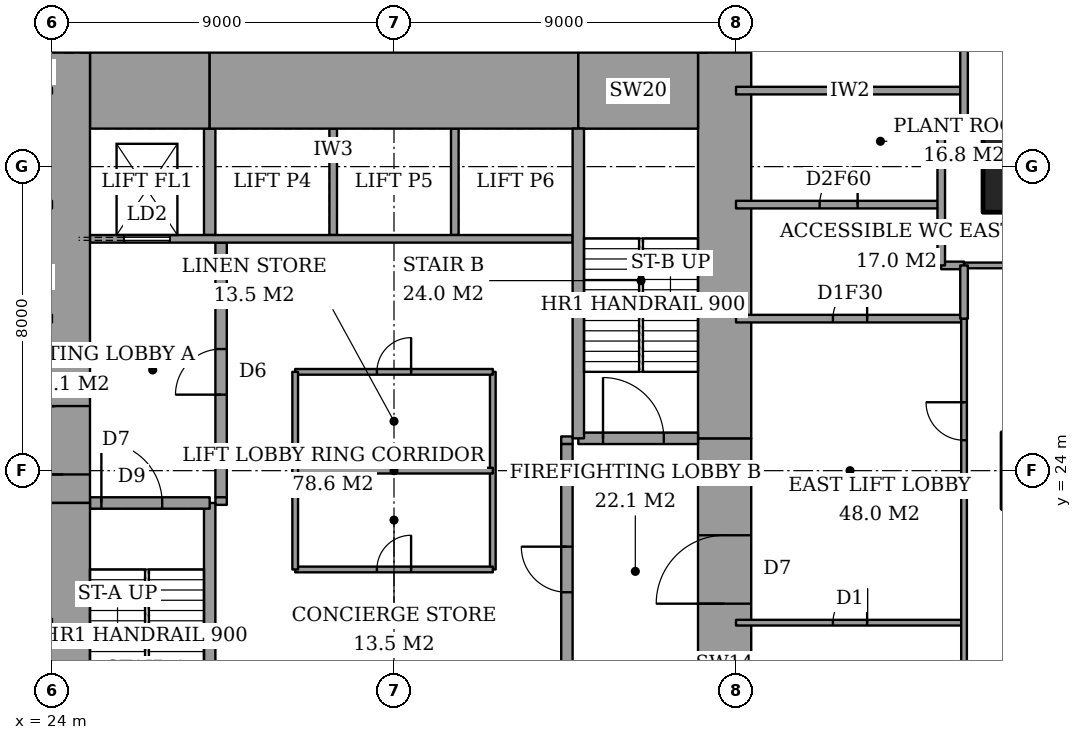
"""IFC4 building model, lengths in metres.
Left out: names, types, materials, properties, quantities, classifications, styles, units other than length and angle.
Written with IfcOpenShell. Run it as: python <this file> out.ifc"""

import sys

from ifc_helpers import new_model, si_unit, direction, frame, frame_2d, origin, origin_2d, place, context, subcontext, project, spatial, rectangle, extrude, element, fill, save


model = new_model("IFC4")
c1 = context("Model", 3, precision=1e-05, world=origin(), true_north=direction((0.0, 1.0)))
c2 = subcontext(c1, "Body", "Model", "MODEL_VIEW")
j1 = project(units=[si_unit("LENGTHUNIT", "METRE"), si_unit("PLANEANGLEUNIT", "RADIAN")], contexts=[c1])
p1 = place(None, origin())
s1 = spatial("IfcSite", under=j1, at=p1, CompositionType="ELEMENT")
p2 = place(p1, origin())
s2 = spatial("IfcBuilding", under=s1, at=p2, CompositionType="ELEMENT")
p3 = place(p2, frame((0.0, 0.0, 6.0)))
s3 = spatial("IfcBuildingStorey", under=s2, at=p3, CompositionType="ELEMENT", Elevation=6.0)
p4 = place(p3, frame((50.0, 32.0, 0.0), z_axis=(0.0, 0.0, 1.0), x_axis=(1.0, 0.0, 0.0)))
e1 = element("IfcColumn", 1, at=p4, inside=s3, PredefinedType="COLUMN", context=c2, shape_type="SweptSolid", body=[
    extrude(rectangle(XDim=3.0, YDim=2.4, at=origin_2d()), origin(), (0.0, 0.0, 1.0), 5.0),
])
p5 = place(p3, frame((25.0, 34.0, 0.0), z_axis=(0.0, 0.0, 1.0), x_axis=(1.0, 0.0, 0.0)))
e2 = element("IfcWall", 2, at=p5, inside=s3, PredefinedType="SHEAR", context=c2, shape_type="SweptSolid", body=[
    extrude(rectangle(XDim=3.15, YDim=2.0, at=frame_2d((1.575, 0.0))), origin(), (0.0, 0.0, 1.0), 5.0),
])
p6 = place(p3, frame((28.15, 34.0, 0.0), z_axis=(0.0, 0.0, 1.0), x_axis=(1.0, 0.0, 0.0)))
e3 = element("IfcWall", 3, at=p6, inside=s3, PredefinedType="SHEAR", context=c2, shape_type="SweptSolid", body=[
    extrude(rectangle(XDim=9.7, YDim=2.0, at=frame_2d((4.85, 0.0))), origin(), (0.0, 0.0, 1.0), 5.0),
])
p7 = place(p3, frame((37.85, 34.0, 0.0), z_axis=(0.0, 0.0, 1.0), x_axis=(1.0, 0.0, 0.0)))
e4 = element("IfcWall", 4, at=p7, inside=s3, PredefinedType="SHEAR", context=c2, shape_type="SweptSolid", body=[
    extrude(rectangle(XDim=3.15, YDim=2.0, at=frame_2d((1.575, 0.0))), origin(), (0.0, 0.0, 1.0), 5.0),
])
p8 = place(p3, frame((24.3, 13.0, 0.0), z_axis=(0.0, 0.0, 1.0), x_axis=(0.0, 1.0, 0.0)))
e5 = element("IfcWall", 5, at=p8, inside=s3, PredefinedType="SHEAR", context=c2, shape_type="SweptSolid", body=[
    extrude(rectangle(XDim=10.15, YDim=1.4, at=frame_2d((5.075, 0.0))), origin(), (0.0, 0.0, 1.0), 5.0),
])
p9 = place(p3, frame((24.3, 23.15, 0.0), z_axis=(0.0, 0.0, 1.0), x_axis=(0.0, 1.0, 0.0)))
e6 = element("IfcWall", 6, at=p9, inside=s3, PredefinedType="SHEAR", context=c2, shape_type="SweptSolid", body=[
    extrude(rectangle(XDim=11.85, YDim=1.4, at=frame_2d((5.925, 0.0))), origin(), (0.0, 0.0, 1.0), 5.0),
])
p10 = place(p9, frame((0.75, 0.0, 0.0)))
e7 = element("IfcOpeningElement", 7, at=p10, cuts=e6, PredefinedType="OPENING", context=c2, shape_type="SweptSolid", body=[
    extrude(rectangle(XDim=1.8, YDim=2.4, at=frame_2d((0.9, 1.2))), frame((0.0, 0.71, 0.0), z_axis=(0.0, -1.0, 0.0), x_axis=(1.0, 0.0, 0.0)), (0.0, 0.0, 1.0), 1.42),
])
p11 = place(p3, frame((41.7, 13.0, 0.0), z_axis=(0.0, 0.0, 1.0), x_axis=(0.0, 1.0, 0.0)))
e8 = element("IfcWall", 8, at=p11, inside=s3, PredefinedType="SHEAR", context=c2, shape_type="SweptSolid", body=[
    extrude(rectangle(XDim=11.85, YDim=1.4, at=frame_2d((5.925, 0.0))), origin(), (0.0, 0.0, 1.0), 5.0),
])
p12 = place(p11, frame((7.5, 0.0, 0.0)))
e9 = element("IfcOpeningElement", 9, at=p12, cuts=e8, PredefinedType="OPENING", context=c2, shape_type="SweptSolid", body=[
    extrude(rectangle(XDim=1.8, YDim=2.4, at=frame_2d((0.9, 1.2))), frame((0.0, 0.71, 0.0), z_axis=(0.0, -1.0, 0.0), x_axis=(1.0, 0.0, 0.0)), (0.0, 0.0, 1.0), 1.42),
])
p13 = place(p3, frame((41.7, 24.85, 0.0), z_axis=(0.0, 0.0, 1.0), x_axis=(0.0, 1.0, 0.0)))
e10 = element("IfcWall", 10, at=p13, inside=s3, PredefinedType="SHEAR", context=c2, shape_type="SweptSolid", body=[
    extrude(rectangle(XDim=10.15, YDim=1.4, at=frame_2d((5.075, 0.0))), origin(), (0.0, 0.0, 1.0), 5.0),
])
p14 = place(p3, frame((28.15, 15.0, 0.0), z_axis=(0.0, 0.0, 1.0), x_axis=(0.0, 1.0, 0.0)))
e11 = element("IfcWall", 11, at=p14, inside=s3, PredefinedType="SHEAR", context=c2, shape_type="SweptSolid", body=[
    extrude(rectangle(XDim=8.15, YDim=0.3, at=frame_2d((4.075, 0.0))), origin(), (0.0, 0.0, 1.0), 5.0),
])
p15 = place(p3, frame((25.0, 23.15, 0.0), z_axis=(0.0, 0.0, 1.0), x_axis=(1.0, 0.0, 0.0)))
e12 = element("IfcWall", 12, at=p15, inside=s3, PredefinedType="SHEAR", context=c2, shape_type="SweptSolid", body=[
    extrude(rectangle(XDim=3.15, YDim=0.3, at=frame_2d((1.575, 0.0))), origin(), (0.0, 0.0, 1.0), 5.0),
])
p16 = place(p15, frame((0.3, 0.0, 0.0)))
e13 = element("IfcOpeningElement", 13, at=p16, cuts=e12, PredefinedType="OPENING", context=c2, shape_type="SweptSolid", body=[
    extrude(rectangle(XDim=1.6, YDim=2.1, at=frame_2d((0.8, 1.05))), frame((0.0, 0.16, 0.0), z_axis=(0.0, -1.0, 0.0), x_axis=(1.0, 0.0, 0.0)), (0.0, 0.0, 1.0), 0.32),
])
p17 = place(p3, frame((37.85, 24.85, 0.0), z_axis=(0.0, 0.0, 1.0), x_axis=(0.0, 1.0, 0.0)))
e14 = element("IfcWall", 14, at=p17, inside=s3, PredefinedType="SHEAR", context=c2, shape_type="SweptSolid", body=[
    extrude(rectangle(XDim=8.15, YDim=0.3, at=frame_2d((4.075, 0.0))), origin(), (0.0, 0.0, 1.0), 5.0),
])
p18 = place(p3, frame((37.85, 24.85, 0.0), z_axis=(0.0, 0.0, 1.0), x_axis=(1.0, 0.0, 0.0)))
e15 = element("IfcWall", 15, at=p18, inside=s3, PredefinedType="SHEAR", context=c2, shape_type="SweptSolid", body=[
    extrude(rectangle(XDim=3.15, YDim=0.3, at=frame_2d((1.575, 0.0))), origin(), (0.0, 0.0, 1.0), 5.0),
])
p19 = place(p18, frame((0.65, 0.0, 0.0)))
e16 = element("IfcOpeningElement", 16, at=p19, cuts=e15, PredefinedType="OPENING", context=c2, shape_type="SweptSolid", body=[
    extrude(rectangle(XDim=1.6, YDim=2.1, at=frame_2d((0.8, 1.05))), frame((0.0, 0.16, 0.0), z_axis=(0.0, -1.0, 0.0), x_axis=(1.0, 0.0, 0.0)), (0.0, 0.0, 1.0), 0.32),
])
p20 = place(p3, frame((28.45, 23.3, 0.0), z_axis=(0.0, 0.0, 1.0), x_axis=(0.0, 1.0, 0.0)))
e17 = element("IfcWall", 17, at=p20, inside=s3, PredefinedType="PARTITIONING", context=c2, shape_type="SweptSolid", body=[
    extrude(rectangle(XDim=6.7, YDim=0.3, at=frame_2d((3.35, 0.0))), origin(), (0.0, 0.0, 1.0), 5.0),
])
p21 = place(p20, frame((2.7, 0.0, 0.0)))
e18 = element("IfcOpeningElement", 18, at=p21, cuts=e17, PredefinedType="OPENING", context=c2, shape_type="SweptSolid", body=[
    extrude(rectangle(XDim=1.2, YDim=2.1, at=frame_2d((0.6, 1.05))), frame((0.0, 0.16, 0.0), z_axis=(0.0, -1.0, 0.0), x_axis=(1.0, 0.0, 0.0)), (0.0, 0.0, 1.0), 0.32),
])
p22 = place(p3, frame((37.55, 18.0, 0.0), z_axis=(0.0, 0.0, 1.0), x_axis=(0.0, 1.0, 0.0)))
e19 = element("IfcWall", 19, at=p22, inside=s3, PredefinedType="PARTITIONING", context=c2, shape_type="SweptSolid", body=[
    extrude(rectangle(XDim=6.7, YDim=0.3, at=frame_2d((3.35, 0.0))), origin(), (0.0, 0.0, 1.0), 5.0),
])
p23 = place(p22, frame((2.8, 0.0, 0.0)))
e20 = element("IfcOpeningElement", 20, at=p23, cuts=e19, PredefinedType="OPENING", context=c2, shape_type="SweptSolid", body=[
    extrude(rectangle(XDim=1.2, YDim=2.1, at=frame_2d((0.6, 1.05))), frame((0.0, 0.16, 0.0), z_axis=(0.0, -1.0, 0.0), x_axis=(1.0, 0.0, 0.0)), (0.0, 0.0, 1.0), 0.32),
])
p24 = place(p3, frame((42.0, 20.0, 0.0), z_axis=(0.0, 0.0, 1.0), x_axis=(1.0, 0.0, 0.0)))
e21 = element("IfcWall", 21, at=p24, inside=s3, PredefinedType="PARTITIONING", context=c2, shape_type="SweptSolid", body=[
    extrude(rectangle(XDim=6.0, YDim=0.15, at=frame_2d((3.0, 0.0))), origin(), (0.0, 0.0, 1.0), 4.7),
])
p25 = place(p24, frame((2.55, 0.0, 0.0)))
e22 = element("IfcOpeningElement", 22, at=p25, cuts=e21, PredefinedType="OPENING", context=c2, shape_type="SweptSolid", body=[
    extrude(rectangle(XDim=0.9, YDim=2.1, at=frame_2d((0.45, 1.05))), frame((0.0, 0.085, 0.0), z_axis=(0.0, -1.0, 0.0), x_axis=(1.0, 0.0, 0.0)), (0.0, 0.0, 1.0), 0.17),
])
p26 = place(p3, frame((42.0, 28.0, 0.0), z_axis=(0.0, 0.0, 1.0), x_axis=(1.0, 0.0, 0.0)))
e23 = element("IfcWall", 23, at=p26, inside=s3, PredefinedType="PARTITIONING", context=c2, shape_type="SweptSolid", body=[
    extrude(rectangle(XDim=6.0, YDim=0.2, at=frame_2d((3.0, 0.0))), origin(), (0.0, 0.0, 1.0), 4.7),
])
p27 = place(p26, frame((2.55, 0.0, 0.0)))
e24 = element("IfcOpeningElement", 24, at=p27, cuts=e23, PredefinedType="OPENING", context=c2, shape_type="SweptSolid", body=[
    extrude(rectangle(XDim=0.9, YDim=2.1, at=frame_2d((0.45, 1.05))), frame((0.0, 0.11, 0.0), z_axis=(0.0, -1.0, 0.0), x_axis=(1.0, 0.0, 0.0)), (0.0, 0.0, 1.0), 0.22),
])
p28 = place(p3, frame((47.4, 29.4, 0.0), z_axis=(0.0, 0.0, 1.0), x_axis=(1.0, 0.0, 0.0)))
e25 = element("IfcWall", 25, at=p28, inside=s3, PredefinedType="PARTITIONING", context=c2, shape_type="SweptSolid", body=[
    extrude(rectangle(XDim=0.6, YDim=0.2, at=frame_2d((0.3, 0.0))), origin(), (0.0, 0.0, 1.0), 4.7),
])
p29 = place(p3, frame((48.0, 29.4, 0.0), z_axis=(0.0, 0.0, 1.0), x_axis=(1.0, 0.0, 0.0)))
e26 = element("IfcWall", 26, at=p29, inside=s3, PredefinedType="PARTITIONING", context=c2, shape_type="SweptSolid", body=[
    extrude(rectangle(XDim=26.6, YDim=0.15, at=frame_2d((13.3, 0.0))), origin(), (0.0, 0.0, 1.0), 4.7),
])
p30 = place(p29, frame((3.5, 0.0, 0.0)))
e27 = element("IfcOpeningElement", 27, at=p30, cuts=e26, PredefinedType="OPENING", context=c2, shape_type="SweptSolid", body=[
    extrude(rectangle(XDim=1.0, YDim=2.1, at=frame_2d((0.5, 1.05))), frame((0.0, 0.085, 0.0), z_axis=(0.0, -1.0, 0.0), x_axis=(1.0, 0.0, 0.0)), (0.0, 0.0, 1.0), 0.17),
])
p31 = place(p3, frame((42.0, 31.0, 0.0), z_axis=(0.0, 0.0, 1.0), x_axis=(1.0, 0.0, 0.0)))
e28 = element("IfcWall", 28, at=p31, inside=s3, PredefinedType="PARTITIONING", context=c2, shape_type="SweptSolid", body=[
    extrude(rectangle(XDim=5.4, YDim=0.2, at=frame_2d((2.7, 0.0))), origin(), (0.0, 0.0, 1.0), 4.7),
])
p32 = place(p31, frame((2.2, 0.0, 0.0)))
e29 = element("IfcOpeningElement", 29, at=p32, cuts=e28, PredefinedType="OPENING", context=c2, shape_type="SweptSolid", body=[
    extrude(rectangle(XDim=1.0, YDim=2.1, at=frame_2d((0.5, 1.05))), frame((0.0, 0.11, 0.0), z_axis=(0.0, -1.0, 0.0), x_axis=(1.0, 0.0, 0.0)), (0.0, 0.0, 1.0), 0.22),
])
p33 = place(p3, frame((47.4, 33.0, 0.0), z_axis=(0.0, 0.0, 1.0), x_axis=(1.0, 0.0, 0.0)))
e30 = element("IfcWall", 30, at=p33, inside=s3, PredefinedType="PARTITIONING", context=c2, shape_type="SweptSolid", body=[
    extrude(rectangle(XDim=0.6, YDim=0.2, at=frame_2d((0.3, 0.0))), origin(), (0.0, 0.0, 1.0), 4.7),
])
p34 = place(p3, frame((48.0, 33.0, 0.0), z_axis=(0.0, 0.0, 1.0), x_axis=(1.0, 0.0, 0.0)))
e31 = element("IfcWall", 31, at=p34, inside=s3, PredefinedType="PARTITIONING", context=c2, shape_type="SweptSolid", body=[
    extrude(rectangle(XDim=0.5, YDim=0.15, at=frame_2d((0.25, 0.0))), origin(), (0.0, 0.0, 1.0), 4.7),
])
p35 = place(p3, frame((42.0, 34.0, 0.0), z_axis=(0.0, 0.0, 1.0), x_axis=(1.0, 0.0, 0.0)))
e32 = element("IfcWall", 32, at=p35, inside=s3, PredefinedType="PARTITIONING", context=c2, shape_type="SweptSolid", body=[
    extrude(rectangle(XDim=6.0, YDim=0.2, at=frame_2d((3.0, 0.0))), origin(), (0.0, 0.0, 1.0), 4.7),
])
p36 = place(p3, frame((47.4, 29.4, 0.0), z_axis=(0.0, 0.0, 1.0), x_axis=(0.0, 1.0, 0.0)))
e33 = element("IfcWall", 33, at=p36, inside=s3, PredefinedType="PARTITIONING", context=c2, shape_type="SweptSolid", body=[
    extrude(rectangle(XDim=3.6, YDim=0.2, at=frame_2d((1.8, 0.0))), origin(), (0.0, 0.0, 1.0), 4.7),
])
p37 = place(p3, frame((48.0, 28.0, 0.0), z_axis=(0.0, 0.0, 1.0), x_axis=(0.0, 1.0, 0.0)))
e34 = element("IfcWall", 34, at=p37, inside=s3, PredefinedType="PARTITIONING", context=c2, shape_type="SweptSolid", body=[
    extrude(rectangle(XDim=1.4, YDim=0.2, at=frame_2d((0.7, 0.0))), origin(), (0.0, 0.0, 1.0), 4.7),
])
p38 = place(p3, frame((48.0, 33.0, 0.0), z_axis=(0.0, 0.0, 1.0), x_axis=(0.0, 1.0, 0.0)))
e35 = element("IfcWall", 35, at=p38, inside=s3, PredefinedType="PARTITIONING", context=c2, shape_type="SweptSolid", body=[
    extrude(rectangle(XDim=23.561, YDim=0.2, at=frame_2d((11.781, 0.0))), origin(), (0.0, 0.0, 1.0), 4.7),
])
p39 = place(p3, frame((48.0, 14.0, 0.0), z_axis=(0.0, 0.0, 1.0), x_axis=(0.0, 1.0, 0.0)))
e36 = element("IfcWall", 36, at=p39, inside=s3, PredefinedType="PARTITIONING", context=c2, shape_type="SweptSolid", body=[
    extrude(rectangle(XDim=14.0, YDim=0.15, at=frame_2d((7.0, 0.0))), origin(), (0.0, 0.0, 1.0), 4.7),
])
p40 = place(p39, frame((10.8, 0.0, 0.0)))
e37 = element("IfcOpeningElement", 37, at=p40, cuts=e36, PredefinedType="OPENING", context=c2, shape_type="SweptSolid", body=[
    extrude(rectangle(XDim=1.0, YDim=2.1, at=frame_2d((0.5, 1.05))), frame((0.0, 0.085, 0.0), z_axis=(0.0, -1.0, 0.0), x_axis=(1.0, 0.0, 0.0)), (0.0, 0.0, 1.0), 0.17),
])
p41 = place(p3, frame((25.0, 30.1, 0.0), z_axis=(0.0, 0.0, 1.0), x_axis=(1.0, 0.0, 0.0)))
e38 = element("IfcWall", 38, at=p41, inside=s3, PredefinedType="PARTITIONING", context=c2, shape_type="SweptSolid", body=[
    extrude(rectangle(XDim=12.7, YDim=0.2, at=frame_2d((6.35, 0.0))), origin(), (0.0, 0.0, 1.0), 5.0),
])
p42 = place(p41, frame((0.9, 0.0, 0.0)))
e39 = element("IfcOpeningElement", 39, at=p42, cuts=e38, PredefinedType="OPENING", context=c2, shape_type="SweptSolid", body=[
    extrude(rectangle(XDim=1.2, YDim=2.1, at=frame_2d((0.6, 1.05))), frame((0.0, 0.11, 0.0), z_axis=(0.0, -1.0, 0.0), x_axis=(1.0, 0.0, 0.0)), (0.0, 0.0, 1.0), 0.22),
])
for number, where, z_axis, x_axis in (
    (40, (31.4, 30.2, 0.0), (0.0, 0.0, 1.0), (0.0, 1.0, 0.0)),
    (41, (34.6, 30.2, 0.0), (0.0, 0.0, 1.0), (0.0, 1.0, 0.0)),
):
    element("IfcWall", number, at=place(p3, frame(where, z_axis=z_axis, x_axis=x_axis)), inside=s3, PredefinedType="PARTITIONING", context=c2, shape_type="SweptSolid", body=[
        extrude(rectangle(XDim=2.8, YDim=0.2, at=frame_2d((1.4, 0.0))), origin(), (0.0, 0.0, 1.0), 5.0),
    ])
p43 = place(p3, frame((28.15, 30.2, 0.0), z_axis=(0.0, 0.0, 1.0), x_axis=(0.0, 1.0, 0.0)))
e42 = element("IfcWall", 42, at=p43, inside=s3, PredefinedType="SHEAR", context=c2, shape_type="SweptSolid", body=[
    extrude(rectangle(XDim=2.8, YDim=0.3, at=frame_2d((1.4, 0.0))), origin(), (0.0, 0.0, 1.0), 5.0),
])
for number, where, z_axis, x_axis in (
    (43, (28.3, 23.2, 0.0), (0.0, 0.0, 1.0), (1.0, 0.0, 0.0)),
    (44, (37.4, 24.8, 0.0), (0.0, 0.0, 1.0), (1.0, 0.0, 0.0)),
):
    element("IfcWall", number, at=place(p3, frame(where, z_axis=z_axis, x_axis=x_axis)), inside=s3, PredefinedType="PARTITIONING", context=c2, shape_type="SweptSolid", body=[
        extrude(rectangle(XDim=0.3, YDim=0.2, at=frame_2d((0.15, 0.0))), origin(), (0.0, 0.0, 1.0), 5.0),
    ])
p44 = place(p3, frame((30.4, 21.4, 0.0), z_axis=(0.0, 0.0, 1.0), x_axis=(1.0, 0.0, 0.0)))
e45 = element("IfcWall", 45, at=p44, inside=s3, PredefinedType="PARTITIONING", context=c2, shape_type="SweptSolid", body=[
    extrude(rectangle(XDim=5.2, YDim=0.15, at=frame_2d((2.6, 0.0))), origin(), (0.0, 0.0, 1.0), 4.7),
])
p45 = place(p44, frame((2.15, 0.0, 0.0)))
e46 = element("IfcOpeningElement", 46, at=p45, cuts=e45, PredefinedType="OPENING", context=c2, shape_type="SweptSolid", body=[
    extrude(rectangle(XDim=0.9, YDim=2.1, at=frame_2d((0.45, 1.05))), frame((0.0, 0.085, 0.0), z_axis=(0.0, -1.0, 0.0), x_axis=(1.0, 0.0, 0.0)), (0.0, 0.0, 1.0), 0.17),
])
p46 = place(p3, frame((30.4, 26.6, 0.0), z_axis=(0.0, 0.0, 1.0), x_axis=(1.0, 0.0, 0.0)))
e47 = element("IfcWall", 47, at=p46, inside=s3, PredefinedType="PARTITIONING", context=c2, shape_type="SweptSolid", body=[
    extrude(rectangle(XDim=5.2, YDim=0.15, at=frame_2d((2.6, 0.0))), origin(), (0.0, 0.0, 1.0), 4.7),
])
p47 = place(p46, frame((2.15, 0.0, 0.0)))
e48 = element("IfcOpeningElement", 48, at=p47, cuts=e47, PredefinedType="OPENING", context=c2, shape_type="SweptSolid", body=[
    extrude(rectangle(XDim=0.9, YDim=2.1, at=frame_2d((0.45, 1.05))), frame((0.0, 0.085, 0.0), z_axis=(0.0, -1.0, 0.0), x_axis=(1.0, 0.0, 0.0)), (0.0, 0.0, 1.0), 0.17),
])
for number, where, z_axis, x_axis in (
    (49, (30.4, 21.4, 0.0), (0.0, 0.0, 1.0), (0.0, 1.0, 0.0)),
    (50, (35.6, 21.4, 0.0), (0.0, 0.0, 1.0), (0.0, 1.0, 0.0)),
    (51, (30.4, 24.0, 0.0), (0.0, 0.0, 1.0), (1.0, 0.0, 0.0)),
):
    element("IfcWall", number, at=place(p3, frame(where, z_axis=z_axis, x_axis=x_axis)), inside=s3, PredefinedType="PARTITIONING", context=c2, shape_type="SweptSolid", body=[
        extrude(rectangle(XDim=5.2, YDim=0.15, at=frame_2d((2.6, 0.0))), origin(), (0.0, 0.0, 1.0), 4.7),
    ])
p48 = place(p40, origin())
e52 = element("IfcDoor", 52, at=p48, inside=s3, OperationType="SINGLE_SWING_LEFT", PredefinedType="DOOR", context=c2, shape_type="SweptSolid", body=[
    extrude(rectangle(XDim=1.0, YDim=2.1, at=frame_2d((0.5, 1.05))), frame((0.0, 0.025, 0.0), z_axis=(0.0, -1.0, 0.0), x_axis=(1.0, 0.0, 0.0)), (0.0, 0.0, 1.0), 0.05),
])
fill(e37, e52)
p49 = place(p27, origin())
e53 = element("IfcDoor", 53, at=p49, inside=s3, OperationType="SINGLE_SWING_LEFT", PredefinedType="DOOR", context=c2, shape_type="SweptSolid", body=[
    extrude(rectangle(XDim=0.9, YDim=2.1, at=frame_2d((0.45, 1.05))), frame((0.0, 0.025, 0.0), z_axis=(0.0, -1.0, 0.0), x_axis=(1.0, 0.0, 0.0)), (0.0, 0.0, 1.0), 0.05),
])
fill(e24, e53)
p50 = place(p25, origin())
e54 = element("IfcDoor", 54, at=p50, inside=s3, OperationType="SINGLE_SWING_LEFT", PredefinedType="DOOR", context=c2, shape_type="SweptSolid", body=[
    extrude(rectangle(XDim=0.9, YDim=2.1, at=frame_2d((0.45, 1.05))), frame((0.0, 0.025, 0.0), z_axis=(0.0, -1.0, 0.0), x_axis=(1.0, 0.0, 0.0)), (0.0, 0.0, 1.0), 0.05),
])
fill(e22, e54)
p51 = place(p32, origin())
e55 = element("IfcDoor", 55, at=p51, inside=s3, OperationType="SINGLE_SWING_LEFT", PredefinedType="DOOR", context=c2, shape_type="SweptSolid", body=[
    extrude(rectangle(XDim=1.0, YDim=2.1, at=frame_2d((0.5, 1.05))), frame((0.0, 0.025, 0.0), z_axis=(0.0, -1.0, 0.0), x_axis=(1.0, 0.0, 0.0)), (0.0, 0.0, 1.0), 0.05),
])
fill(e29, e55)
p52 = place(p16, origin())
e56 = element("IfcDoor", 56, at=p52, inside=s3, OperationType="DOUBLE_DOOR_SINGLE_SWING", PredefinedType="DOOR", context=c2, shape_type="SweptSolid", body=[
    extrude(rectangle(XDim=1.6, YDim=2.1, at=frame_2d((0.8, 1.05))), frame((0.0, 0.025, 0.0), z_axis=(0.0, -1.0, 0.0), x_axis=(1.0, 0.0, 0.0)), (0.0, 0.0, 1.0), 0.05),
])
fill(e13, e56)
p53 = place(p19, origin())
e57 = element("IfcDoor", 57, at=p53, inside=s3, OperationType="DOUBLE_DOOR_SINGLE_SWING", PredefinedType="DOOR", context=c2, shape_type="SweptSolid", body=[
    extrude(rectangle(XDim=1.6, YDim=2.1, at=frame_2d((0.8, 1.05))), frame((0.0, 0.025, 0.0), z_axis=(0.0, -1.0, 0.0), x_axis=(1.0, 0.0, 0.0)), (0.0, 0.0, 1.0), 0.05),
])
fill(e16, e57)
p54 = place(p21, origin())
e58 = element("IfcDoor", 58, at=p54, inside=s3, OperationType="SINGLE_SWING_RIGHT", PredefinedType="DOOR", context=c2, shape_type="SweptSolid", body=[
    extrude(rectangle(XDim=1.2, YDim=2.1, at=frame_2d((0.6, 1.05))), frame((0.0, 0.025, 0.0), z_axis=(0.0, -1.0, 0.0), x_axis=(1.0, 0.0, 0.0)), (0.0, 0.0, 1.0), 0.05),
])
fill(e18, e58)
p55 = place(p23, origin())
e59 = element("IfcDoor", 59, at=p55, inside=s3, OperationType="SINGLE_SWING_LEFT", PredefinedType="DOOR", context=c2, shape_type="SweptSolid", body=[
    extrude(rectangle(XDim=1.2, YDim=2.1, at=frame_2d((0.6, 1.05))), frame((0.0, 0.025, 0.0), z_axis=(0.0, -1.0, 0.0), x_axis=(1.0, 0.0, 0.0)), (0.0, 0.0, 1.0), 0.05),
])
fill(e20, e59)
p56 = place(p10, origin())
e60 = element("IfcDoor", 60, at=p56, inside=s3, OperationType="DOUBLE_DOOR_DOUBLE_SWING", PredefinedType="DOOR", context=c2, shape_type="SweptSolid", body=[
    extrude(rectangle(XDim=1.8, YDim=2.4, at=frame_2d((0.9, 1.2))), frame((0.0, 0.025, 0.0), z_axis=(0.0, -1.0, 0.0), x_axis=(1.0, 0.0, 0.0)), (0.0, 0.0, 1.0), 0.05),
])
fill(e7, e60)
p57 = place(p12, origin())
e61 = element("IfcDoor", 61, at=p57, inside=s3, OperationType="DOUBLE_DOOR_DOUBLE_SWING", PredefinedType="DOOR", context=c2, shape_type="SweptSolid", body=[
    extrude(rectangle(XDim=1.8, YDim=2.4, at=frame_2d((0.9, 1.2))), frame((0.0, 0.025, 0.0), z_axis=(0.0, -1.0, 0.0), x_axis=(1.0, 0.0, 0.0)), (0.0, 0.0, 1.0), 0.05),
])
fill(e9, e61)
p58 = place(p45, origin())
e62 = element("IfcDoor", 62, at=p58, inside=s3, OperationType="SINGLE_SWING_LEFT", PredefinedType="DOOR", context=c2, shape_type="SweptSolid", body=[
    extrude(rectangle(XDim=0.9, YDim=2.1, at=frame_2d((0.45, 1.05))), frame((0.0, 0.025, 0.0), z_axis=(0.0, -1.0, 0.0), x_axis=(1.0, 0.0, 0.0)), (0.0, 0.0, 1.0), 0.05),
])
fill(e46, e62)
p59 = place(p47, origin())
e63 = element("IfcDoor", 63, at=p59, inside=s3, OperationType="SINGLE_SWING_LEFT", PredefinedType="DOOR", context=c2, shape_type="SweptSolid", body=[
    extrude(rectangle(XDim=0.9, YDim=2.1, at=frame_2d((0.45, 1.05))), frame((0.0, 0.025, 0.0), z_axis=(0.0, -1.0, 0.0), x_axis=(1.0, 0.0, 0.0)), (0.0, 0.0, 1.0), 0.05),
])
fill(e48, e63)
p60 = place(p42, origin())
e64 = element("IfcDoor", 64, at=p60, inside=s3, OperationType="SLIDING_TO_LEFT", PredefinedType="DOOR", context=c2, shape_type="SweptSolid", body=[
    extrude(rectangle(XDim=1.2, YDim=2.1, at=frame_2d((0.6, 1.05))), frame((0.0, 0.025, 0.0), z_axis=(0.0, -1.0, 0.0), x_axis=(1.0, 0.0, 0.0)), (0.0, 0.0, 1.0), 0.05),
])
fill(e39, e64)
save(model, sys.argv[1])
